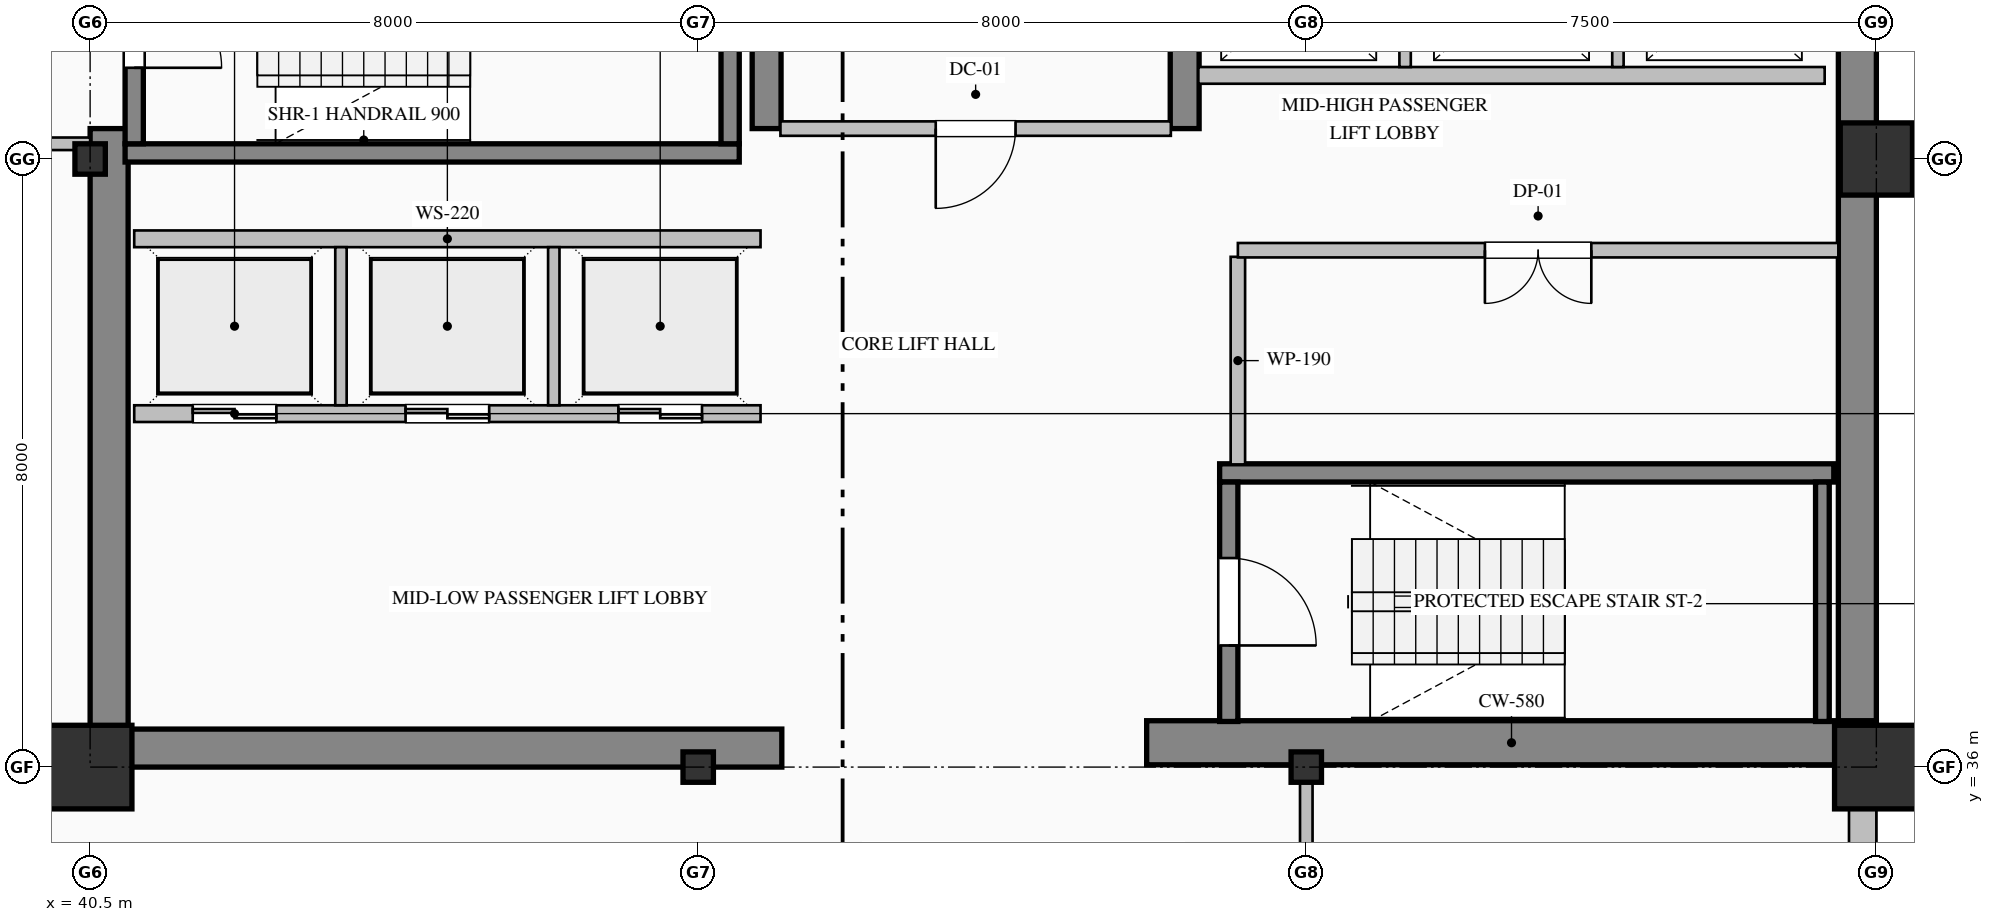
"""IFC4 building model, lengths in metres.
Left out: names, types, materials, properties, quantities, classifications, styles, units other than length and angle.
Written with IfcOpenShell. Run it as: python <this file> out.ifc"""

import sys

from ifc_helpers import new_model, si_unit, direction, frame, frame_2d, origin, origin_2d, place, context, subcontext, project, spatial, rectangle, hollow_rectangle, i_section, extrude, element, fill, save


model = new_model("IFC4")
c1 = context("Model", 3, precision=1e-05, world=origin(), true_north=direction((0.0, 1.0)))
c2 = subcontext(c1, "Body", "Model", "MODEL_VIEW")
j1 = project(units=[si_unit("LENGTHUNIT", "METRE"), si_unit("PLANEANGLEUNIT", "RADIAN")], contexts=[c1])
p1 = place(None, origin())
s1 = spatial("IfcSite", under=j1, at=p1, CompositionType="ELEMENT")
p2 = place(p1, origin())
s2 = spatial("IfcBuilding", under=s1, at=p2, CompositionType="ELEMENT")
p3 = place(p2, frame((0.0, 0.0, 171.0)))
s3 = spatial("IfcBuildingStorey", under=s2, at=p3, CompositionType="ELEMENT", Elevation=171.0)
p4 = place(p3, frame((63.75, 36.32, 0.0), z_axis=(0.0, 0.0, 1.0), x_axis=(0.0, 1.0, 0.0)))
e1 = element("IfcWall", 1, at=p4, inside=s3, PredefinedType="SHEAR", context=c2, shape_type="SweptSolid", body=[
    extrude(rectangle(XDim=15.18, YDim=0.5, at=frame_2d((7.59, 0.0))), origin(), (0.0, 0.0, 1.0), 3.765),
])
p5 = place(p3, frame((40.75, 36.5, 0.0), z_axis=(0.0, 0.0, 1.0), x_axis=(0.0, 1.0, 0.0)))
e2 = element("IfcWall", 2, at=p5, inside=s3, PredefinedType="SHEAR", context=c2, shape_type="SweptSolid", body=[
    extrude(rectangle(XDim=7.9, YDim=0.5, at=frame_2d((3.95, 0.0))), origin(), (0.0, 0.0, 1.0), 3.765),
])
p6 = place(p3, frame((40.5, 36.25, 0.0), z_axis=(0.0, 0.0, 1.0), x_axis=(1.0, 0.0, 0.0)))
e3 = element("IfcWall", 3, at=p6, inside=s3, PredefinedType="SHEAR", context=c2, shape_type="SweptSolid", body=[
    extrude(rectangle(XDim=9.1, YDim=0.5, at=frame_2d((4.55, 0.0))), origin(), (0.0, 0.0, 1.0), 3.765),
])
p7 = place(p3, frame((54.4, 36.32, 0.0), z_axis=(0.0, 0.0, 1.0), x_axis=(1.0, 0.0, 0.0)))
e4 = element("IfcWall", 4, at=p7, inside=s3, PredefinedType="SHEAR", context=c2, shape_type="SweptSolid", body=[
    extrude(rectangle(XDim=9.6, YDim=0.58, at=frame_2d((4.8, 0.0))), origin(), (0.0, 0.0, 1.0), 4.0),
])
p8 = place(p3, frame((49.4, 44.4, 0.0), z_axis=(0.0, 0.0, 1.0), x_axis=(0.0, 1.0, 0.0)))
e5 = element("IfcWall", 5, at=p8, inside=s3, PredefinedType="SHEAR", context=c2, shape_type="SweptSolid", body=[
    extrude(rectangle(XDim=3.0, YDim=0.38, at=frame_2d((1.5, 0.0))), origin(), (0.0, 0.0, 1.0), 3.765),
])
p9 = place(p3, frame((54.9, 44.4, 0.0), z_axis=(0.0, 0.0, 1.0), x_axis=(0.0, 1.0, 0.0)))
e6 = element("IfcWall", 6, at=p9, inside=s3, PredefinedType="SHEAR", context=c2, shape_type="SweptSolid", body=[
    extrude(rectangle(XDim=7.1, YDim=0.38, at=frame_2d((3.55, 0.0))), origin(), (0.0, 0.0, 1.0), 3.765),
])
p10 = place(p3, frame((40.5, 36.0, 0.0), z_axis=(0.0, 0.0, 1.0), x_axis=(1.0, 0.0, 0.0)))
e7 = element("IfcColumn", 7, at=p10, inside=s3, PredefinedType="COLUMN", context=c2, shape_type="SweptSolid", body=[
    extrude(hollow_rectangle(XDim=1.1, YDim=1.1, WallThickness=0.04, at=origin_2d()), origin(), (0.0, 0.0, 1.0), 4.0),
])
for number, where, z_axis, x_axis in (
    (8, (40.5, 44.0, 0.0), (0.0, 0.0, 1.0), (1.0, 0.0, 0.0)),
    (9, (48.5, 36.0, 0.0), (0.0, 0.0, 1.0), (1.0, 0.0, 0.0)),
    (10, (56.5, 36.0, 0.0), (0.0, 0.0, 1.0), (1.0, 0.0, 0.0)),
):
    element("IfcColumn", number, at=place(p3, frame(where, z_axis=z_axis, x_axis=x_axis)), inside=s3, PredefinedType="COLUMN", context=c2, shape_type="SweptSolid", body=[
        extrude(i_section(OverallWidth=0.4, OverallDepth=0.4, WebThickness=0.013, FlangeThickness=0.021, FilletRadius=0.022, at=origin_2d()), origin(), (0.0, 0.0, 1.0), 4.0),
    ])
p11 = place(p3, frame((64.0, 36.0, 0.0), z_axis=(0.0, 0.0, 1.0), x_axis=(1.0, 0.0, 0.0)))
e11 = element("IfcColumn", 11, at=p11, inside=s3, PredefinedType="COLUMN", context=c2, shape_type="SweptSolid", body=[
    extrude(hollow_rectangle(XDim=1.1, YDim=1.1, WallThickness=0.04, at=origin_2d()), origin(), (0.0, 0.0, 1.0), 4.0),
])
p12 = place(p3, frame((64.0, 44.0, 0.0), z_axis=(0.0, 0.0, 1.0), x_axis=(1.0, 0.0, 0.0)))
e12 = element("IfcColumn", 12, at=p12, inside=s3, PredefinedType="COLUMN", context=c2, shape_type="SweptSolid", body=[
    extrude(hollow_rectangle(XDim=0.95, YDim=0.95, WallThickness=0.036, at=origin_2d()), origin(), (0.0, 0.0, 1.0), 4.0),
])
p13 = place(p3, frame((63.82, 36.05, 0.0), z_axis=(0.0, 0.0, 1.0), x_axis=(0.0, -1.0, 0.0)))
e13 = element("IfcWall", 13, at=p13, inside=s3, PredefinedType="SOLIDWALL", context=c2, shape_type="SweptSolid", body=[
    extrude(rectangle(XDim=28.05, YDim=0.36, at=frame_2d((14.025, 0.0))), origin(), (0.0, 0.0, 1.0), 3.265),
])
p14 = place(p13, frame((3.0, 0.0, 0.7)))
e14 = element("IfcOpeningElement", 14, at=p14, cuts=e13, PredefinedType="OPENING", context=c2, shape_type="SweptSolid", body=[
    extrude(rectangle(XDim=1.2, YDim=1.85, at=frame_2d((0.6, 0.925))), frame((0.0, 0.19, 0.0), z_axis=(0.0, -1.0, 0.0), x_axis=(1.0, 0.0, 0.0)), (0.0, 0.0, 1.0), 0.38),
])
p15 = place(p13, frame((13.8, 0.0, 0.7)))
e15 = element("IfcOpeningElement", 15, at=p15, cuts=e13, PredefinedType="OPENING", context=c2, shape_type="SweptSolid", body=[
    extrude(rectangle(XDim=1.2, YDim=1.85, at=frame_2d((0.6, 0.925))), frame((0.0, 0.19, 0.0), z_axis=(0.0, -1.0, 0.0), x_axis=(1.0, 0.0, 0.0)), (0.0, 0.0, 1.0), 0.38),
])
p16 = place(p13, frame((24.6, 0.0, 0.7)))
e16 = element("IfcOpeningElement", 16, at=p16, cuts=e13, PredefinedType="OPENING", context=c2, shape_type="SweptSolid", body=[
    extrude(rectangle(XDim=1.2, YDim=1.85, at=frame_2d((0.6, 0.925))), frame((0.0, 0.19, 0.0), z_axis=(0.0, -1.0, 0.0), x_axis=(1.0, 0.0, 0.0)), (0.0, 0.0, 1.0), 0.38),
])
p17 = place(p3, frame((49.04, 44.08, 0.0), z_axis=(0.0, 0.0, 1.0), x_axis=(-1.0, 0.0, 0.0)))
e17 = element("IfcWall", 17, at=p17, inside=s3, PredefinedType="SOLIDWALL", context=c2, shape_type="SweptSolid", body=[
    extrude(rectangle(XDim=8.08, YDim=0.24, at=frame_2d((4.04, 0.0))), origin(), (0.0, 0.0, 1.0), 4.0),
])
p18 = place(p3, frame((41.08, 47.35, 0.0), z_axis=(0.0, 0.0, 1.0), x_axis=(0.0, -1.0, 0.0)))
e18 = element("IfcWall", 18, at=p18, inside=s3, PredefinedType="SOLIDWALL", context=c2, shape_type="SweptSolid", body=[
    extrude(rectangle(XDim=3.15, YDim=0.24, at=frame_2d((1.575, 0.0))), origin(), (0.0, 0.0, 1.0), 4.0),
])
p19 = place(p18, frame((1.0, 0.0, 0.0)))
e19 = element("IfcOpeningElement", 19, at=p19, cuts=e18, PredefinedType="OPENING", context=c2, shape_type="SweptSolid", body=[
    extrude(rectangle(XDim=1.15, YDim=2.2, at=frame_2d((0.575, 1.1))), frame((0.0, 0.13, 0.0), z_axis=(0.0, -1.0, 0.0), x_axis=(1.0, 0.0, 0.0)), (0.0, 0.0, 1.0), 0.26),
])
p20 = place(p3, frame((48.92, 44.2, 0.0), z_axis=(0.0, 0.0, 1.0), x_axis=(0.0, 1.0, 0.0)))
e20 = element("IfcWall", 20, at=p20, inside=s3, PredefinedType="SOLIDWALL", context=c2, shape_type="SweptSolid", body=[
    extrude(rectangle(XDim=3.15, YDim=0.24, at=frame_2d((1.575, 0.0))), origin(), (0.0, 0.0, 1.0), 4.0),
])
p21 = place(p3, frame((55.36, 39.87, 0.0), z_axis=(0.0, 0.0, 1.0), x_axis=(1.0, 0.0, 0.0)))
e21 = element("IfcWall", 21, at=p21, inside=s3, PredefinedType="SOLIDWALL", context=c2, shape_type="SweptSolid", body=[
    extrude(rectangle(XDim=8.08, YDim=0.24, at=frame_2d((4.04, 0.0))), origin(), (0.0, 0.0, 1.0), 4.0),
])
p22 = place(p3, frame((55.48, 39.75, 0.0), z_axis=(0.0, 0.0, 1.0), x_axis=(0.0, -1.0, 0.0)))
e22 = element("IfcWall", 22, at=p22, inside=s3, PredefinedType="SOLIDWALL", context=c2, shape_type="SweptSolid", body=[
    extrude(rectangle(XDim=3.15, YDim=0.24, at=frame_2d((1.575, 0.0))), origin(), (0.0, 0.0, 1.0), 4.0),
])
p23 = place(p22, frame((1.0, 0.0, 0.0)))
e23 = element("IfcOpeningElement", 23, at=p23, cuts=e22, PredefinedType="OPENING", context=c2, shape_type="SweptSolid", body=[
    extrude(rectangle(XDim=1.15, YDim=2.2, at=frame_2d((0.575, 1.1))), frame((0.0, 0.13, 0.0), z_axis=(0.0, -1.0, 0.0), x_axis=(1.0, 0.0, 0.0)), (0.0, 0.0, 1.0), 0.26),
])
p24 = place(p3, frame((63.29, 36.6, 0.0), z_axis=(0.0, 0.0, 1.0), x_axis=(0.0, 1.0, 0.0)))
e24 = element("IfcWall", 24, at=p24, inside=s3, PredefinedType="SOLIDWALL", context=c2, shape_type="SweptSolid", body=[
    extrude(rectangle(XDim=3.15, YDim=0.18, at=frame_2d((1.575, 0.0))), origin(), (0.0, 0.0, 1.0), 4.0),
])
p25 = place(p3, frame((49.32, 40.65, 0.0), z_axis=(0.0, 0.0, 1.0), x_axis=(-1.0, 0.0, 0.0)))
e25 = element("IfcWall", 25, at=p25, inside=s3, PredefinedType="PARTITIONING", context=c2, shape_type="SweptSolid", body=[
    extrude(rectangle(XDim=8.24, YDim=0.22, at=frame_2d((4.12, 0.0))), origin(), (0.0, 0.0, 1.0), 3.765),
])
p26 = place(p25, frame((6.37, 0.0, 0.0)))
e26 = element("IfcOpeningElement", 26, at=p26, cuts=e25, PredefinedType="OPENING", context=c2, shape_type="SweptSolid", body=[
    extrude(rectangle(XDim=1.1, YDim=2.2, at=frame_2d((0.55, 1.1))), frame((0.0, 0.12, 0.0), z_axis=(0.0, -1.0, 0.0), x_axis=(1.0, 0.0, 0.0)), (0.0, 0.0, 1.0), 0.24),
])
p27 = place(p25, frame((3.57, 0.0, 0.0)))
e27 = element("IfcOpeningElement", 27, at=p27, cuts=e25, PredefinedType="OPENING", context=c2, shape_type="SweptSolid", body=[
    extrude(rectangle(XDim=1.1, YDim=2.2, at=frame_2d((0.55, 1.1))), frame((0.0, 0.12, 0.0), z_axis=(0.0, -1.0, 0.0), x_axis=(1.0, 0.0, 0.0)), (0.0, 0.0, 1.0), 0.24),
])
p28 = place(p25, frame((0.77, 0.0, 0.0)))
e28 = element("IfcOpeningElement", 28, at=p28, cuts=e25, PredefinedType="OPENING", context=c2, shape_type="SweptSolid", body=[
    extrude(rectangle(XDim=1.1, YDim=2.2, at=frame_2d((0.55, 1.1))), frame((0.0, 0.12, 0.0), z_axis=(0.0, -1.0, 0.0), x_axis=(1.0, 0.0, 0.0)), (0.0, 0.0, 1.0), 0.24),
])
p29 = place(p3, frame((41.08, 42.95, 0.0), z_axis=(0.0, 0.0, 1.0), x_axis=(1.0, 0.0, 0.0)))
e29 = element("IfcWall", 29, at=p29, inside=s3, PredefinedType="PARTITIONING", context=c2, shape_type="SweptSolid", body=[
    extrude(rectangle(XDim=8.24, YDim=0.22, at=frame_2d((4.12, 0.0))), origin(), (0.0, 0.0, 1.0), 3.765),
])
for number, where, z_axis, x_axis in (
    (30, (43.8, 40.76, 0.0), (0.0, 0.0, 1.0), (0.0, 1.0, 0.0)),
    (31, (46.6, 40.76, 0.0), (0.0, 0.0, 1.0), (0.0, 1.0, 0.0)),
):
    element("IfcWall", number, at=place(p3, frame(where, z_axis=z_axis, x_axis=x_axis)), inside=s3, PredefinedType="PARTITIONING", context=c2, shape_type="SweptSolid", body=[
        extrude(rectangle(XDim=2.08, YDim=0.15, at=frame_2d((1.04, 0.0))), origin(), (0.0, 0.0, 1.0), 3.765),
    ])
p30 = place(p3, frame((63.32, 45.1, 0.0), z_axis=(0.0, 0.0, 1.0), x_axis=(-1.0, 0.0, 0.0)))
e32 = element("IfcWall", 32, at=p30, inside=s3, PredefinedType="PARTITIONING", context=c2, shape_type="SweptSolid", body=[
    extrude(rectangle(XDim=8.24, YDim=0.22, at=frame_2d((4.12, 0.0))), origin(), (0.0, 0.0, 1.0), 3.765),
])
for number, where, z_axis, x_axis in (
    (33, (57.8, 45.21, 0.0), (0.0, 0.0, 1.0), (0.0, 1.0, 0.0)),
    (34, (60.6, 45.21, 0.0), (0.0, 0.0, 1.0), (0.0, 1.0, 0.0)),
):
    element("IfcWall", number, at=place(p3, frame(where, z_axis=z_axis, x_axis=x_axis)), inside=s3, PredefinedType="PARTITIONING", context=c2, shape_type="SweptSolid", body=[
        extrude(rectangle(XDim=2.03, YDim=0.15, at=frame_2d((1.015, 0.0))), origin(), (0.0, 0.0, 1.0), 3.765),
    ])
p31 = place(p3, frame((40.5, 44.2, 0.0), z_axis=(0.0, 0.0, 1.0), x_axis=(-1.0, 0.0, 0.0)))
e35 = element("IfcWall", 35, at=p31, inside=s3, PredefinedType="PARTITIONING", context=c2, shape_type="SweptSolid", body=[
    extrude(rectangle(XDim=2.7, YDim=0.165, at=frame_2d((1.35, 0.0))), origin(), (0.0, 0.0, 1.0), 3.765),
])
p32 = place(p31, frame((0.825, 0.0, 0.0)))
e36 = element("IfcOpeningElement", 36, at=p32, cuts=e35, PredefinedType="OPENING", context=c2, shape_type="SweptSolid", body=[
    extrude(rectangle(XDim=1.05, YDim=2.15, at=frame_2d((0.525, 1.075))), frame((0.0, 0.093, 0.0), z_axis=(0.0, -1.0, 0.0), x_axis=(1.0, 0.0, 0.0)), (0.0, 0.0, 1.0), 0.185),
])
p33 = place(p3, frame((54.718, 44.4, 0.0), z_axis=(0.0, 0.0, 1.0), x_axis=(-1.0, 0.0, 0.0)))
e37 = element("IfcWall", 37, at=p33, inside=s3, PredefinedType="PARTITIONING", context=c2, shape_type="SweptSolid", body=[
    extrude(rectangle(XDim=5.136, YDim=0.19, at=frame_2d((2.568, 0.0))), origin(), (0.0, 0.0, 1.0), 3.765),
])
p34 = place(p33, frame((2.043, 0.0, 0.0)))
e38 = element("IfcOpeningElement", 38, at=p34, cuts=e37, PredefinedType="OPENING", context=c2, shape_type="SweptSolid", body=[
    extrude(rectangle(XDim=1.05, YDim=2.15, at=frame_2d((0.525, 1.075))), frame((0.0, 0.105, 0.0), z_axis=(0.0, -1.0, 0.0), x_axis=(1.0, 0.0, 0.0)), (0.0, 0.0, 1.0), 0.21),
])
p35 = place(p3, frame((55.6, 42.713, 0.0), z_axis=(0.0, 0.0, 1.0), x_axis=(0.0, -1.0, 0.0)))
e39 = element("IfcWall", 39, at=p35, inside=s3, PredefinedType="PARTITIONING", context=c2, shape_type="SweptSolid", body=[
    extrude(rectangle(XDim=2.731, YDim=0.19, at=frame_2d((1.365, 0.0))), origin(), (0.0, 0.0, 1.0), 3.765),
])
p36 = place(p3, frame((63.5, 42.8, 0.0), z_axis=(0.0, 0.0, 1.0), x_axis=(-1.0, 0.0, 0.0)))
e40 = element("IfcWall", 40, at=p36, inside=s3, PredefinedType="PARTITIONING", context=c2, shape_type="SweptSolid", body=[
    extrude(rectangle(XDim=7.9, YDim=0.19, at=frame_2d((3.95, 0.0))), origin(), (0.0, 0.0, 1.0), 3.765),
])
p37 = place(p36, frame((3.25, 0.0, 0.0)))
e41 = element("IfcOpeningElement", 41, at=p37, cuts=e40, PredefinedType="OPENING", context=c2, shape_type="SweptSolid", body=[
    extrude(rectangle(XDim=1.4, YDim=2.25, at=frame_2d((0.7, 1.125))), frame((0.0, 0.105, 0.0), z_axis=(0.0, -1.0, 0.0), x_axis=(1.0, 0.0, 0.0)), (0.0, 0.0, 1.0), 0.21),
])
p38 = place(p3, frame((56.5, 36.0, 0.0), z_axis=(0.0, 0.0, 1.0), x_axis=(0.0, -1.0, 0.0)))
e42 = element("IfcWall", 42, at=p38, inside=s3, PredefinedType="PARTITIONING", context=c2, shape_type="SweptSolid", body=[
    extrude(rectangle(XDim=2.325, YDim=0.165, at=frame_2d((1.163, 0.0))), origin(), (0.0, 0.0, 1.0), 3.157),
])
p39 = place(p19, origin())
e43 = element("IfcDoor", 43, at=p39, inside=s3, OperationType="SINGLE_SWING_RIGHT", PredefinedType="DOOR", context=c2, shape_type="SweptSolid", body=[
    extrude(rectangle(XDim=1.15, YDim=2.2, at=frame_2d((0.575, 1.1))), frame((0.0, 0.025, 0.0), z_axis=(0.0, -1.0, 0.0), x_axis=(1.0, 0.0, 0.0)), (0.0, 0.0, 1.0), 0.05),
])
fill(e19, e43)
p40 = place(p23, origin())
e44 = element("IfcDoor", 44, at=p40, inside=s3, OperationType="SINGLE_SWING_RIGHT", PredefinedType="DOOR", context=c2, shape_type="SweptSolid", body=[
    extrude(rectangle(XDim=1.15, YDim=2.2, at=frame_2d((0.575, 1.1))), frame((0.0, 0.025, 0.0), z_axis=(0.0, -1.0, 0.0), x_axis=(1.0, 0.0, 0.0)), (0.0, 0.0, 1.0), 0.05),
])
fill(e23, e44)
p41 = place(p26, origin())
e45 = element("IfcDoor", 45, at=p41, inside=s3, OperationType="DOUBLE_DOOR_SLIDING", PredefinedType="DOOR", context=c2, shape_type="SweptSolid", body=[
    extrude(rectangle(XDim=1.1, YDim=2.2, at=frame_2d((0.55, 1.1))), frame((0.0, 0.025, 0.0), z_axis=(0.0, -1.0, 0.0), x_axis=(1.0, 0.0, 0.0)), (0.0, 0.0, 1.0), 0.05),
])
fill(e26, e45)
p42 = place(p27, origin())
e46 = element("IfcDoor", 46, at=p42, inside=s3, OperationType="DOUBLE_DOOR_SLIDING", PredefinedType="DOOR", context=c2, shape_type="SweptSolid", body=[
    extrude(rectangle(XDim=1.1, YDim=2.2, at=frame_2d((0.55, 1.1))), frame((0.0, 0.025, 0.0), z_axis=(0.0, -1.0, 0.0), x_axis=(1.0, 0.0, 0.0)), (0.0, 0.0, 1.0), 0.05),
])
fill(e27, e46)
p43 = place(p28, origin())
e47 = element("IfcDoor", 47, at=p43, inside=s3, OperationType="DOUBLE_DOOR_SLIDING", PredefinedType="DOOR", context=c2, shape_type="SweptSolid", body=[
    extrude(rectangle(XDim=1.1, YDim=2.2, at=frame_2d((0.55, 1.1))), frame((0.0, 0.025, 0.0), z_axis=(0.0, -1.0, 0.0), x_axis=(1.0, 0.0, 0.0)), (0.0, 0.0, 1.0), 0.05),
])
fill(e28, e47)
p44 = place(p34, origin())
e48 = element("IfcDoor", 48, at=p44, inside=s3, OperationType="SINGLE_SWING_RIGHT", PredefinedType="DOOR", context=c2, shape_type="SweptSolid", body=[
    extrude(rectangle(XDim=1.05, YDim=2.15, at=frame_2d((0.525, 1.075))), frame((0.0, 0.025, 0.0), z_axis=(0.0, -1.0, 0.0), x_axis=(1.0, 0.0, 0.0)), (0.0, 0.0, 1.0), 0.05),
])
fill(e38, e48)
p45 = place(p37, origin())
e49 = element("IfcDoor", 49, at=p45, inside=s3, OperationType="DOUBLE_DOOR_SINGLE_SWING", PredefinedType="DOOR", context=c2, shape_type="SweptSolid", body=[
    extrude(rectangle(XDim=1.4, YDim=2.25, at=frame_2d((0.7, 1.125))), frame((0.0, 0.025, 0.0), z_axis=(0.0, -1.0, 0.0), x_axis=(1.0, 0.0, 0.0)), (0.0, 0.0, 1.0), 0.05),
])
fill(e41, e49)
save(model, sys.argv[1])
